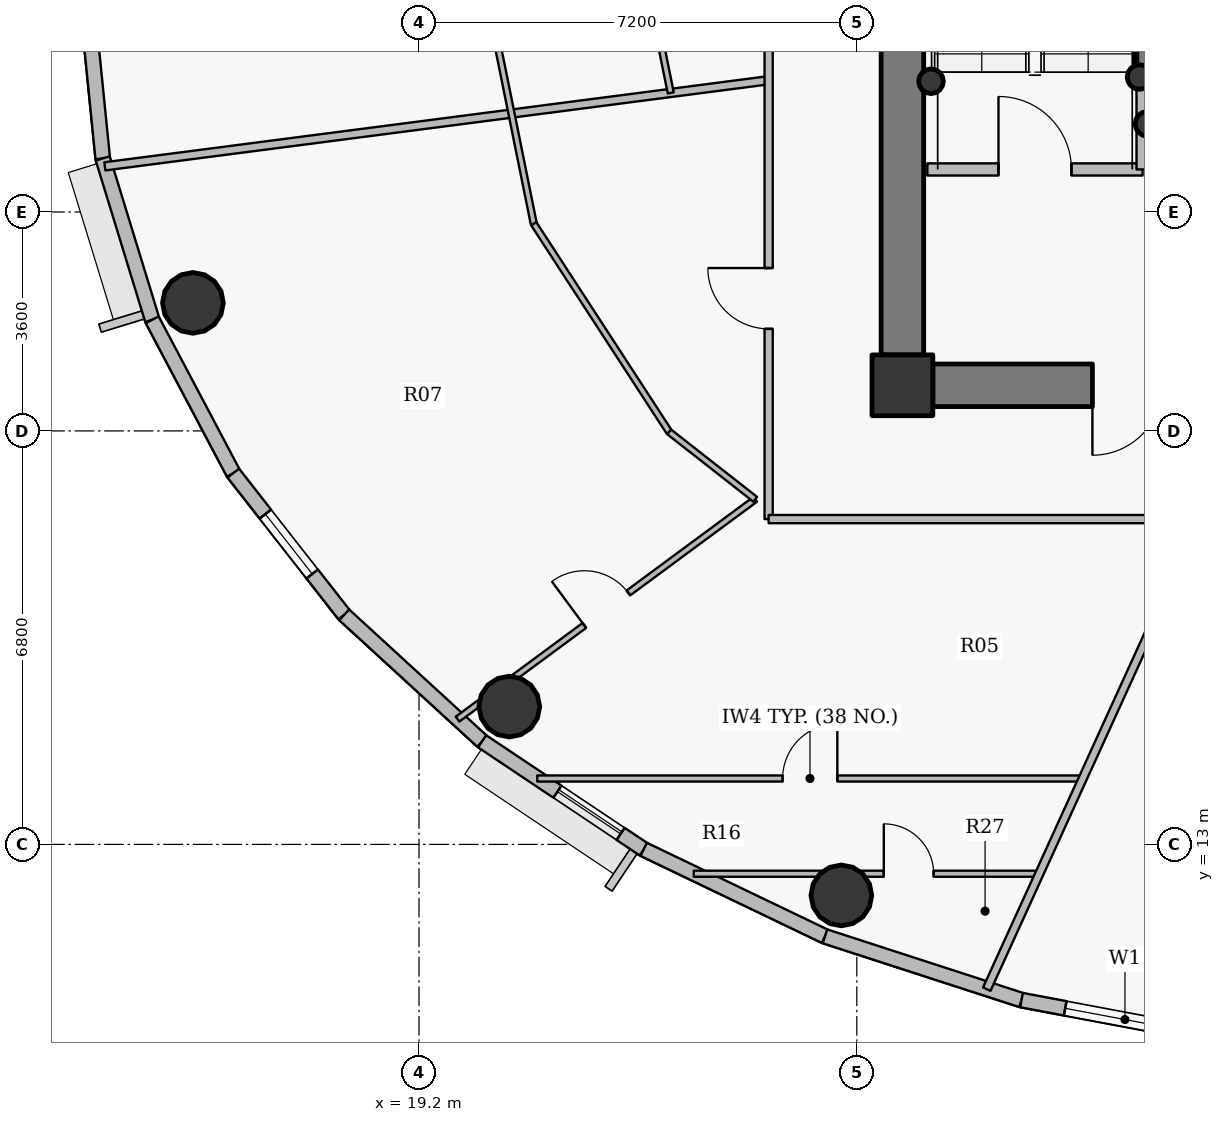
"""IFC4 building model, lengths in metres.
Left out: names, types, materials, properties, quantities, classifications, styles, units other than length and angle.
Written with IfcOpenShell. Run it as: python <this file> out.ifc"""

import sys

from ifc_helpers import new_model, si_unit, direction, frame, frame_2d, origin, origin_2d, place, context, subcontext, project, spatial, rectangle, hollow_circle, extrude, source, transform, mapped, element, fill, save


model = new_model("IFC4")
c1 = context("Model", 3, precision=1e-05, world=origin(), true_north=direction((0.0, 1.0)))
c2 = subcontext(c1, "Body", "Model", "MODEL_VIEW")
j1 = project(units=[si_unit("LENGTHUNIT", "METRE"), si_unit("PLANEANGLEUNIT", "RADIAN")], contexts=[c1])
p1 = place(None, origin())
s1 = spatial("IfcSite", under=j1, at=p1, CompositionType="ELEMENT")
p2 = place(p1, origin())
s2 = spatial("IfcBuilding", under=s1, at=p2, CompositionType="ELEMENT")
p3 = place(p2, frame((0.0, 0.0, 303.0)))
s3 = spatial("IfcBuildingStorey", under=s2, at=p3, CompositionType="ELEMENT", Elevation=303.0)
p4 = place(p3, frame((27.15, 20.55, 0.0), z_axis=(0.0, 0.0, 1.0), x_axis=(1.0, 0.0, 0.0)))
e1 = element("IfcColumn", 1, at=p4, inside=s3, PredefinedType="COLUMN", context=c2, shape_type="SweptSolid", body=[
    extrude(rectangle(XDim=1.0, YDim=1.0, at=origin_2d()), origin(), (0.0, 0.0, 1.0), 3.75),
])
for number, where, z_axis, x_axis in (
    (2, (31.05, 25.62, 0.0), (0.0, 0.0, 1.0), (1.0, 0.0, 0.0)),
    (3, (31.18, 24.85, 0.0), (0.0, 0.0, 1.0), (1.0, 0.0, 0.0)),
    (4, (27.62, 25.55, 0.0), (0.0, 0.0, 1.0), (1.0, 0.0, 0.0)),
):
    element("IfcColumn", number, at=place(p3, frame(where, z_axis=z_axis, x_axis=x_axis)), inside=s3, PredefinedType="COLUMN", context=c2, shape_type="SweptSolid", body=[
        extrude(hollow_circle(Radius=0.203, WallThickness=0.016, at=origin_2d()), origin(), (0.0, 0.0, 1.0), 3.75),
    ])
p5 = place(p3, frame((44.35, 20.55, 0.0), z_axis=(0.0, 0.0, 1.0), x_axis=(-1.0, 0.0, 0.0)))
e5 = element("IfcWall", 5, at=p5, inside=s3, PredefinedType="SHEAR", context=c2, shape_type="SweptSolid", body=[
    extrude(rectangle(XDim=16.7, YDim=0.7, at=frame_2d((8.35, 0.0))), origin(), (0.0, 0.0, 1.0), 3.05),
])
p6 = place(p5, frame((12.925, 0.0, 0.0)))
e6 = element("IfcOpeningElement", 6, at=p6, cuts=e5, PredefinedType="OPENING", context=c2, shape_type="SweptSolid", body=[
    extrude(rectangle(XDim=1.15, YDim=2.15, at=origin_2d()), frame((0.575, 0.36, 1.075), z_axis=(0.0, -1.0, 0.0), x_axis=(1.0, 0.0, 0.0)), (0.0, 0.0, 1.0), 0.72),
])
p7 = place(p5, frame((9.1, 0.0, 0.0)))
e7 = element("IfcOpeningElement", 7, at=p7, cuts=e5, PredefinedType="OPENING", context=c2, shape_type="SweptSolid", body=[
    extrude(rectangle(XDim=1.15, YDim=2.15, at=origin_2d()), frame((0.575, 0.36, 1.075), z_axis=(0.0, -1.0, 0.0), x_axis=(1.0, 0.0, 0.0)), (0.0, 0.0, 1.0), 0.72),
])
p8 = place(p3, frame((27.15, 21.05, 0.0), z_axis=(0.0, 0.0, 1.0), x_axis=(0.0, 1.0, 0.0)))
e8 = element("IfcWall", 8, at=p8, inside=s3, PredefinedType="SHEAR", context=c2, shape_type="SweptSolid", body=[
    extrude(rectangle(XDim=11.9, YDim=0.7, at=frame_2d((5.95, 0.0))), origin(), (0.0, 0.0, 1.0), 3.05),
])
p9 = place(p3, frame((31.18, 25.55, 0.0), z_axis=(0.0, 0.0, 1.0), x_axis=(0.0, 1.0, 0.0)))
e9 = element("IfcWall", 9, at=p9, inside=s3, PredefinedType="SHEAR", context=c2, shape_type="SweptSolid", body=[
    extrude(rectangle(XDim=2.25, YDim=0.4, at=frame_2d((1.125, 0.0))), origin(), (0.0, 0.0, 1.0), 3.1),
])
for number, where, z_axis, x_axis in (
    (10, (15.481, 21.906, 0.0), (0.0, 0.0, 1.0), (1.0, 0.0, 0.0)),
    (11, (20.685, 15.267, 0.0), (0.0, 0.0, 1.0), (1.0, 0.0, 0.0)),
    (12, (26.146, 12.161, 0.0), (0.0, 0.0, 1.0), (1.0, 0.0, 0.0)),
):
    element("IfcColumn", number, at=place(p3, frame(where, z_axis=z_axis, x_axis=x_axis)), inside=s3, PredefinedType="COLUMN", context=c2, shape_type="SweptSolid", body=[
        extrude(hollow_circle(Radius=0.5, WallThickness=0.032, at=origin_2d()), origin(), (0.0, 0.0, 1.0), 3.75),
    ])
p10 = place(p3, frame((13.998, 24.281, 0.0), z_axis=(0.0, 0.0, 1.0), x_axis=(-0.099972526841, 0.99499019788, 0.0)))
e13 = element("IfcWall", 13, at=p10, inside=s3, PredefinedType="SOLIDWALL", context=c2, shape_type="SweptSolid", body=[
    extrude(rectangle(XDim=2.733, YDim=0.24, at=frame_2d((1.366, 0.0))), origin(), (0.0, 0.0, 1.0), 3.5),
])
p11 = place(p3, frame((14.812, 21.628, 0.0), z_axis=(0.0, 0.0, 1.0), x_axis=(-0.2931213403, 0.956075248012, 0.0)))
e14 = element("IfcWall", 14, at=p11, inside=s3, PredefinedType="SOLIDWALL", context=c2, shape_type="SweptSolid", body=[
    extrude(rectangle(XDim=2.775, YDim=0.24, at=frame_2d((1.388, 0.0))), origin(), (0.0, 0.0, 1.0), 3.5),
])
p12 = place(p3, frame((16.146, 19.105, 0.0), z_axis=(0.0, 0.0, 1.0), x_axis=(-0.467628269026, 0.883925224218, 0.0)))
e15 = element("IfcWall", 15, at=p12, inside=s3, PredefinedType="SOLIDWALL", context=c2, shape_type="SweptSolid", body=[
    extrude(rectangle(XDim=2.854, YDim=0.24, at=frame_2d((1.427, 0.0))), origin(), (0.0, 0.0, 1.0), 3.5),
])
p13 = place(p3, frame((17.97, 16.775, 0.0), z_axis=(0.0, 0.0, 1.0), x_axis=(-0.616337186556, 0.787482363275, 0.0)))
e16 = element("IfcWall", 16, at=p13, inside=s3, PredefinedType="SOLIDWALL", context=c2, shape_type="SweptSolid", body=[
    extrude(rectangle(XDim=2.958, YDim=0.24, at=frame_2d((1.479, 0.0))), origin(), (0.0, 0.0, 1.0), 3.5),
])
p14 = place(p13, frame((0.854, 0.0, 0.9)))
e17 = element("IfcOpeningElement", 17, at=p14, cuts=e16, PredefinedType="OPENING", context=c2, shape_type="SweptSolid", body=[
    extrude(rectangle(XDim=1.25, YDim=1.65, at=origin_2d()), frame((0.625, 0.13, 0.825), z_axis=(0.0, -1.0, 0.0), x_axis=(1.0, 0.0, 0.0)), (0.0, 0.0, 1.0), 0.26),
])
p15 = place(p3, frame((20.238, 14.696, 0.0), z_axis=(0.0, 0.0, 1.0), x_axis=(-0.737068506972, 0.675818034703, 0.0)))
e18 = element("IfcWall", 18, at=p15, inside=s3, PredefinedType="SOLIDWALL", context=c2, shape_type="SweptSolid", body=[
    extrude(rectangle(XDim=3.077, YDim=0.24, at=frame_2d((1.539, 0.0))), origin(), (0.0, 0.0, 1.0), 3.5),
])
p16 = place(p3, frame((22.896, 12.918, 0.0), z_axis=(0.0, 0.0, 1.0), x_axis=(-0.831250592635, 0.55589787933, 0.0)))
e19 = element("IfcWall", 19, at=p16, inside=s3, PredefinedType="SOLIDWALL", context=c2, shape_type="SweptSolid", body=[
    extrude(rectangle(XDim=3.197, YDim=0.24, at=frame_2d((1.599, 0.0))), origin(), (0.0, 0.0, 1.0), 3.5),
])
p17 = place(p16, frame((0.458, 0.0, 0.9)))
e20 = element("IfcOpeningElement", 20, at=p17, cuts=e19, PredefinedType="OPENING", context=c2, shape_type="SweptSolid", body=[
    extrude(rectangle(XDim=1.25, YDim=1.65, at=origin_2d()), frame((0.625, 0.13, 0.825), z_axis=(0.0, -1.0, 0.0), x_axis=(1.0, 0.0, 0.0)), (0.0, 0.0, 1.0), 0.26),
])
p18 = place(p3, frame((25.877, 11.488, 0.0), z_axis=(0.0, 0.0, 1.0), x_axis=(-0.901573741254, 0.43262546051, 0.0)))
e21 = element("IfcWall", 21, at=p18, inside=s3, PredefinedType="SOLIDWALL", context=c2, shape_type="SweptSolid", body=[
    extrude(rectangle(XDim=3.307, YDim=0.24, at=frame_2d((1.653, 0.0))), origin(), (0.0, 0.0, 1.0), 3.5),
])
p19 = place(p3, frame((29.109, 10.44, 0.0), z_axis=(0.0, 0.0, 1.0), x_axis=(-0.95123136723, 0.308478339592, 0.0)))
e22 = element("IfcWall", 22, at=p19, inside=s3, PredefinedType="SOLIDWALL", context=c2, shape_type="SweptSolid", body=[
    extrude(rectangle(XDim=3.398, YDim=0.24, at=frame_2d((1.699, 0.0))), origin(), (0.0, 0.0, 1.0), 3.5),
])
p20 = place(p3, frame((32.511, 9.8, 0.0), z_axis=(0.0, 0.0, 1.0), x_axis=(-0.982782655757, 0.184765395959, 0.0)))
e23 = element("IfcWall", 23, at=p20, inside=s3, PredefinedType="SOLIDWALL", context=c2, shape_type="SweptSolid", body=[
    extrude(rectangle(XDim=3.462, YDim=0.24, at=frame_2d((1.731, 0.0))), origin(), (0.0, 0.0, 1.0), 3.5),
])
p21 = place(p20, frame((0.731, 0.0, 0.9)))
e24 = element("IfcOpeningElement", 24, at=p21, cuts=e23, PredefinedType="OPENING", context=c2, shape_type="SweptSolid", body=[
    extrude(rectangle(XDim=2.0, YDim=1.75, at=origin_2d()), frame((1.0, 0.13, 0.875), z_axis=(0.0, -1.0, 0.0), x_axis=(1.0, 0.0, 0.0)), (0.0, 0.0, 1.0), 0.26),
])
p22 = place(p3, frame((14.033, 24.151, 0.0), z_axis=(0.0, 0.0, 1.0), x_axis=(0.99169266035, 0.128629963101, 0.0)))
e25 = element("IfcWall", 25, at=p22, inside=s3, PredefinedType="PARTITIONING", context=c2, shape_type="SweptSolid", body=[
    extrude(rectangle(XDim=11.009, YDim=0.135, at=frame_2d((5.504, 0.0))), origin(), (0.0, 0.0, 1.0), 2.985),
])
p23 = place(p3, frame((19.833, 15.06, 0.0), z_axis=(0.0, 0.0, 1.0), x_axis=(0.804387847123, 0.594104529019, 0.0)))
e26 = element("IfcWall", 26, at=p23, inside=s3, PredefinedType="PARTITIONING", context=c2, shape_type="SweptSolid", body=[
    extrude(rectangle(XDim=6.086, YDim=0.1, at=frame_2d((3.043, 0.0))), origin(), (0.0, 0.0, 1.0), 3.5),
])
p24 = place(p23, frame((2.593, 0.0, 0.0)))
e27 = element("IfcOpeningElement", 27, at=p24, cuts=e26, PredefinedType="OPENING", context=c2, shape_type="SweptSolid", body=[
    extrude(rectangle(XDim=0.9, YDim=2.1, at=origin_2d()), frame((0.45, 0.06, 1.05), z_axis=(0.0, -1.0, 0.0), x_axis=(1.0, 0.0, 0.0)), (0.0, 0.0, 1.0), 0.12),
])
p25 = place(p3, frame((20.32, 27.0, 0.0), z_axis=(0.0, 0.0, 1.0), x_axis=(0.198226068862, -0.980156327135, 0.0)))
e28 = element("IfcWall", 28, at=p25, inside=s3, PredefinedType="PARTITIONING", context=c2, shape_type="SweptSolid", body=[
    extrude(rectangle(XDim=3.871, YDim=0.1, at=frame_2d((1.936, 0.0))), origin(), (0.0, 0.0, 1.0), 3.035),
])
p26 = place(p3, frame((21.087, 23.206, 0.0), z_axis=(0.0, 0.0, 1.0), x_axis=(0.545435886628, -0.838152547916, 0.0)))
e29 = element("IfcWall", 29, at=p26, inside=s3, PredefinedType="PARTITIONING", context=c2, shape_type="SweptSolid", body=[
    extrude(rectangle(XDim=4.083, YDim=0.1, at=frame_2d((2.042, 0.0))), origin(), (0.0, 0.0, 1.0), 3.035),
])
p27 = place(p3, frame((21.144, 14.084, 0.0), z_axis=(0.0, 0.0, 1.0), x_axis=(1.0, 0.0, 0.0)))
e30 = element("IfcWall", 30, at=p27, inside=s3, PredefinedType="PARTITIONING", context=c2, shape_type="SweptSolid", body=[
    extrude(rectangle(XDim=8.971, YDim=0.1, at=frame_2d((4.486, 0.0))), origin(), (0.0, 0.0, 1.0), 2.985),
])
p28 = place(p27, frame((4.036, 0.0, 0.0)))
e31 = element("IfcOpeningElement", 31, at=p28, cuts=e30, PredefinedType="OPENING", context=c2, shape_type="SweptSolid", body=[
    extrude(rectangle(XDim=0.9, YDim=2.1, at=origin_2d()), frame((0.45, 0.06, 1.05), z_axis=(0.0, -1.0, 0.0), x_axis=(1.0, 0.0, 0.0)), (0.0, 0.0, 1.0), 0.12),
])
p29 = place(p3, frame((23.008, 27.0, 0.0), z_axis=(0.0, 0.0, 1.0), x_axis=(0.198189512146, -0.980163719628, 0.0)))
e32 = element("IfcWall", 32, at=p29, inside=s3, PredefinedType="PARTITIONING", context=c2, shape_type="SweptSolid", body=[
    extrude(rectangle(XDim=1.675, YDim=0.1, at=frame_2d((0.838, 0.0))), origin(), (0.0, 0.0, 1.0), 3.035),
])
p30 = place(p3, frame((23.315, 19.783, 0.0), z_axis=(0.0, 0.0, 1.0), x_axis=(0.787284128546, -0.616590383431, 0.0)))
e33 = element("IfcWall", 33, at=p30, inside=s3, PredefinedType="PARTITIONING", context=c2, shape_type="SweptSolid", body=[
    extrude(rectangle(XDim=1.796, YDim=0.1, at=frame_2d((0.898, 0.0))), origin(), (0.0, 0.0, 1.0), 3.5),
])
p31 = place(p3, frame((23.719, 12.518, 0.0), z_axis=(0.0, 0.0, 1.0), x_axis=(1.0, 0.0, 0.0)))
e34 = element("IfcWall", 34, at=p31, inside=s3, PredefinedType="PARTITIONING", context=c2, shape_type="SweptSolid", body=[
    extrude(rectangle(XDim=5.683, YDim=0.1, at=frame_2d((2.842, 0.0))), origin(), (0.0, 0.0, 1.0), 2.985),
])
p32 = place(p31, frame((3.125, 0.0, 0.0)))
e35 = element("IfcOpeningElement", 35, at=p32, cuts=e34, PredefinedType="OPENING", context=c2, shape_type="SweptSolid", body=[
    extrude(rectangle(XDim=0.82, YDim=2.1, at=origin_2d()), frame((0.41, 0.06, 1.05), z_axis=(0.0, -1.0, 0.0), x_axis=(1.0, 0.0, 0.0)), (0.0, 0.0, 1.0), 0.12),
])
p33 = place(p3, frame((24.95, 18.35, 0.0), z_axis=(0.0, 0.0, 1.0), x_axis=(0.0, 1.0, 0.0)))
e36 = element("IfcWall", 36, at=p33, inside=s3, PredefinedType="PARTITIONING", context=c2, shape_type="SweptSolid", body=[
    extrude(rectangle(XDim=11.45, YDim=0.135, at=frame_2d((5.725, 0.0))), origin(), (0.0, 0.0, 1.0), 3.035),
])
p34 = place(p33, frame((3.128, 0.0, 0.0)))
e37 = element("IfcOpeningElement", 37, at=p34, cuts=e36, PredefinedType="OPENING", context=c2, shape_type="SweptSolid", body=[
    extrude(rectangle(XDim=1.0, YDim=2.15, at=origin_2d()), frame((0.5, 0.078, 1.075), z_axis=(0.0, -1.0, 0.0), x_axis=(1.0, 0.0, 0.0)), (0.0, 0.0, 1.0), 0.155),
])
p35 = place(p3, frame((24.95, 18.35, 0.0), z_axis=(0.0, 0.0, 1.0), x_axis=(1.0, 0.0, 0.0)))
e38 = element("IfcWall", 38, at=p35, inside=s3, PredefinedType="PARTITIONING", context=c2, shape_type="SweptSolid", body=[
    extrude(rectangle(XDim=22.1, YDim=0.135, at=frame_2d((11.05, 0.0))), origin(), (0.0, 0.0, 1.0), 3.035),
])
p36 = place(p35, frame((8.131, 0.0, 0.0)))
e39 = element("IfcOpeningElement", 39, at=p36, cuts=e38, PredefinedType="OPENING", context=c2, shape_type="SweptSolid", body=[
    extrude(rectangle(XDim=1.0, YDim=2.15, at=origin_2d()), frame((0.5, 0.078, 1.075), z_axis=(0.0, -1.0, 0.0), x_axis=(1.0, 0.0, 0.0)), (0.0, 0.0, 1.0), 0.155),
])
p37 = place(p35, frame((19.081, 0.0, 0.0)))
e40 = element("IfcOpeningElement", 40, at=p37, cuts=e38, PredefinedType="OPENING", context=c2, shape_type="SweptSolid", body=[
    extrude(rectangle(XDim=1.0, YDim=2.15, at=origin_2d()), frame((0.5, 0.078, 1.075), z_axis=(0.0, -1.0, 0.0), x_axis=(1.0, 0.0, 0.0)), (0.0, 0.0, 1.0), 0.155),
])
p38 = place(p3, frame((27.56, 24.1, 0.0), z_axis=(0.0, 0.0, 1.0), x_axis=(1.0, 0.0, 0.0)))
e41 = element("IfcWall", 41, at=p38, inside=s3, PredefinedType="PARTITIONING", context=c2, shape_type="SweptSolid", body=[
    extrude(rectangle(XDim=3.54, YDim=0.2, at=frame_2d((1.77, 0.0))), origin(), (0.0, 0.0, 1.0), 3.5),
])
p39 = place(p38, frame((1.17, 0.0, 0.0)))
e42 = element("IfcOpeningElement", 42, at=p39, cuts=e41, PredefinedType="OPENING", context=c2, shape_type="SweptSolid", body=[
    extrude(rectangle(XDim=1.2, YDim=2.15, at=origin_2d()), frame((0.6, 0.11, 1.075), z_axis=(0.0, -1.0, 0.0), x_axis=(1.0, 0.0, 0.0)), (0.0, 0.0, 1.0), 0.22),
])
p40 = place(p3, frame((28.537, 10.62, 0.0), z_axis=(0.0, 0.0, 1.0), x_axis=(0.414582330606, 0.910011808247, 0.0)))
e43 = element("IfcWall", 43, at=p40, inside=s3, PredefinedType="PARTITIONING", context=c2, shape_type="SweptSolid", body=[
    extrude(rectangle(XDim=8.495, YDim=0.135, at=frame_2d((4.247, 0.0))), origin(), (0.0, 0.0, 1.0), 2.985),
])
p41 = place(p3, frame((31.1, 24.1, 0.0), z_axis=(0.0, 0.0, 1.0), x_axis=(0.0, 1.0, 0.0)))
e44 = element("IfcWall", 44, at=p41, inside=s3, PredefinedType="PARTITIONING", context=c2, shape_type="SweptSolid", body=[
    extrude(rectangle(XDim=1.44, YDim=0.2, at=frame_2d((0.72, 0.0))), origin(), (0.0, 0.0, 1.0), 3.5),
])
p42 = place(p3, frame((26.8, 21.04, 0.0), z_axis=(0.0, 0.0, 1.0), x_axis=(0.0, -1.0, 0.0)))
e45 = element("IfcWall", 45, at=p42, inside=s3, PredefinedType="PARTITIONING", context=c2, shape_type="SweptSolid", body=[
    extrude(rectangle(XDim=0.84, YDim=0.135, at=frame_2d((0.42, 0.0))), origin(), (0.0, 0.0, 1.0), 3.035),
])
p43 = place(p3, frame((27.107, 20.2, 0.0), z_axis=(0.0, 0.0, 1.0), x_axis=(1.0, 0.0, 0.0)))
e46 = element("IfcWall", 46, at=p43, inside=s3, PredefinedType="PARTITIONING", context=c2, shape_type="SweptSolid", body=[
    extrude(rectangle(XDim=0.532, YDim=0.135, at=frame_2d((0.266, 0.0))), origin(), (0.0, 0.0, 1.0), 3.035),
])
m1 = source(origin(), c2, "Body", "SweptSolid", [
    extrude(rectangle(XDim=1.25, YDim=1.65, at=origin_2d()), frame((0.625, 0.03, 0.825), z_axis=(0.0, -1.0, 0.0), x_axis=(1.0, 0.0, 0.0)), (0.0, 0.0, 1.0), 0.06),
])
p44 = place(p14, origin())
e47 = element("IfcWindow", 47, at=p44, inside=s3, PartitioningType="SINGLE_PANEL", PredefinedType="WINDOW", context=c2, shape_type="MappedRepresentation", body=[
    mapped(m1, transform((0.0, 0.0, 0.0), x_axis=(1.0, 0.0, 0.0), y_axis=(0.0, 1.0, 0.0), z_axis=(0.0, 0.0, 1.0), scale=1.0)),
])
fill(e17, e47)
m2 = source(origin(), c2, "Body", "SweptSolid", [
    extrude(rectangle(XDim=2.0, YDim=1.75, at=origin_2d()), frame((1.0, 0.03, 0.875), z_axis=(0.0, -1.0, 0.0), x_axis=(1.0, 0.0, 0.0)), (0.0, 0.0, 1.0), 0.06),
])
p45 = place(p21, origin())
e48 = element("IfcWindow", 48, at=p45, inside=s3, PartitioningType="DOUBLE_PANEL_VERTICAL", PredefinedType="WINDOW", context=c2, shape_type="MappedRepresentation", body=[
    mapped(m2, transform((0.0, 0.0, 0.0), x_axis=(1.0, 0.0, 0.0), y_axis=(0.0, 1.0, 0.0), z_axis=(0.0, 0.0, 1.0), scale=1.0)),
])
fill(e24, e48)
p46 = place(p17, origin())
e49 = element("IfcWindow", 49, at=p46, inside=s3, PartitioningType="SINGLE_PANEL", PredefinedType="WINDOW", context=c2, shape_type="MappedRepresentation", body=[
    mapped(m1, transform((0.0, 0.0, 0.0), x_axis=(1.0, 0.0, 0.0), y_axis=(0.0, 1.0, 0.0), z_axis=(0.0, 0.0, 1.0), scale=1.0)),
])
fill(e20, e49)
m3 = source(origin(), c2, "Body", "SweptSolid", [
    extrude(rectangle(XDim=1.15, YDim=2.15, at=origin_2d()), frame((0.575, 0.025, 1.075), z_axis=(0.0, -1.0, 0.0), x_axis=(1.0, 0.0, 0.0)), (0.0, 0.0, 1.0), 0.05),
])
p47 = place(p6, origin())
e50 = element("IfcDoor", 50, at=p47, inside=s3, OperationType="SINGLE_SWING_RIGHT", PredefinedType="DOOR", context=c2, shape_type="MappedRepresentation", body=[
    mapped(m3, transform((0.0, 0.0, 0.0), x_axis=(1.0, 0.0, 0.0), y_axis=(0.0, 1.0, 0.0), z_axis=(0.0, 0.0, 1.0), scale=1.0)),
])
fill(e6, e50)
m4 = source(origin(), c2, "Body", "SweptSolid", [
    extrude(rectangle(XDim=1.2, YDim=2.15, at=origin_2d()), frame((0.6, 0.025, 1.075), z_axis=(0.0, -1.0, 0.0), x_axis=(1.0, 0.0, 0.0)), (0.0, 0.0, 1.0), 0.05),
])
p48 = place(p39, origin())
e51 = element("IfcDoor", 51, at=p48, inside=s3, OperationType="SINGLE_SWING_LEFT", PredefinedType="DOOR", context=c2, shape_type="MappedRepresentation", body=[
    mapped(m4, transform((0.0, 0.0, 0.0), x_axis=(1.0, 0.0, 0.0), y_axis=(0.0, 1.0, 0.0), z_axis=(0.0, 0.0, 1.0), scale=1.0)),
])
fill(e42, e51)
m5 = source(origin(), c2, "Body", "SweptSolid", [
    extrude(rectangle(XDim=1.0, YDim=2.15, at=origin_2d()), frame((0.5, 0.025, 1.075), z_axis=(0.0, -1.0, 0.0), x_axis=(1.0, 0.0, 0.0)), (0.0, 0.0, 1.0), 0.05),
])
p49 = place(p34, origin())
e52 = element("IfcDoor", 52, at=p49, inside=s3, OperationType="SINGLE_SWING_RIGHT", PredefinedType="DOOR", context=c2, shape_type="MappedRepresentation", body=[
    mapped(m5, transform((0.0, 0.0, 0.0), x_axis=(1.0, 0.0, 0.0), y_axis=(0.0, 1.0, 0.0), z_axis=(0.0, 0.0, 1.0), scale=1.0)),
])
fill(e37, e52)
m6 = source(origin(), c2, "Body", "SweptSolid", [
    extrude(rectangle(XDim=0.9, YDim=2.1, at=origin_2d()), frame((0.45, 0.025, 1.05), z_axis=(0.0, -1.0, 0.0), x_axis=(1.0, 0.0, 0.0)), (0.0, 0.0, 1.0), 0.05),
])
p50 = place(p24, origin())
e53 = element("IfcDoor", 53, at=p50, inside=s3, OperationType="SINGLE_SWING_LEFT", PredefinedType="DOOR", context=c2, shape_type="MappedRepresentation", body=[
    mapped(m6, transform((0.0, 0.0, 0.0), x_axis=(1.0, 0.0, 0.0), y_axis=(0.0, 1.0, 0.0), z_axis=(0.0, 0.0, 1.0), scale=1.0)),
])
fill(e27, e53)
p51 = place(p28, origin())
e54 = element("IfcDoor", 54, at=p51, inside=s3, OperationType="SINGLE_SWING_RIGHT", PredefinedType="DOOR", context=c2, shape_type="MappedRepresentation", body=[
    mapped(m6, transform((0.0, 0.0, 0.0), x_axis=(1.0, 0.0, 0.0), y_axis=(0.0, 1.0, 0.0), z_axis=(0.0, 0.0, 1.0), scale=1.0)),
])
fill(e31, e54)
m7 = source(origin(), c2, "Body", "SweptSolid", [
    extrude(rectangle(XDim=0.82, YDim=2.1, at=origin_2d()), frame((0.41, 0.025, 1.05), z_axis=(0.0, -1.0, 0.0), x_axis=(1.0, 0.0, 0.0)), (0.0, 0.0, 1.0), 0.05),
])
p52 = place(p32, origin())
e55 = element("IfcDoor", 55, at=p52, inside=s3, OperationType="SINGLE_SWING_LEFT", PredefinedType="DOOR", context=c2, shape_type="MappedRepresentation", body=[
    mapped(m7, transform((0.0, 0.0, 0.0), x_axis=(1.0, 0.0, 0.0), y_axis=(0.0, 1.0, 0.0), z_axis=(0.0, 0.0, 1.0), scale=1.0)),
])
fill(e35, e55)
save(model, sys.argv[1])
